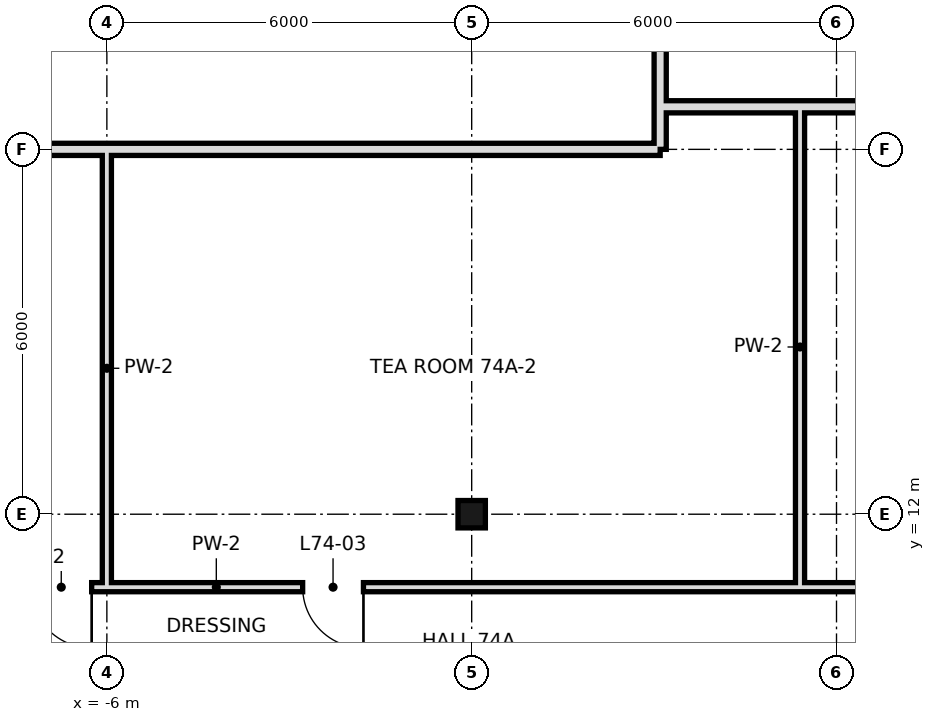
"""IFC4 building model, lengths in metres.
Left out: names, types, materials, properties, quantities, classifications, styles, units other than length and angle.
Written with IfcOpenShell. Run it as: python <this file> out.ifc"""

import sys

from ifc_helpers import new_model, si_unit, direction, frame, frame_2d, origin, origin_2d, place, context, subcontext, project, spatial, rectangle, hollow_rectangle, extrude, element, fill, save


model = new_model("IFC4")
c1 = context("Model", 3, precision=1e-05, world=origin(), true_north=direction((0.0, 1.0)))
c2 = subcontext(c1, "Body", "Model", "MODEL_VIEW")
j1 = project(units=[si_unit("LENGTHUNIT", "METRE"), si_unit("PLANEANGLEUNIT", "RADIAN")], contexts=[c1])
p1 = place(None, origin())
s1 = spatial("IfcSite", under=j1, at=p1, CompositionType="ELEMENT")
p2 = place(p1, origin())
s2 = spatial("IfcBuilding", under=s1, at=p2, CompositionType="ELEMENT")
p3 = place(p2, frame((0.0, 0.0, 312.4)))
s3 = spatial("IfcBuildingStorey", under=s2, at=p3, CompositionType="ELEMENT", Elevation=312.4)
p4 = place(p3, frame((0.0, 12.0, 0.0), z_axis=(0.0, 0.0, 1.0), x_axis=(1.0, 0.0, 0.0)))
e1 = element("IfcColumn", 1, at=p4, inside=s3, PredefinedType="COLUMN", context=c2, shape_type="SweptSolid", body=[
    extrude(hollow_rectangle(XDim=0.45, YDim=0.45, WallThickness=0.022, at=origin_2d()), origin(), (0.0, 0.0, 1.0), 3.6),
])
p5 = place(p3, frame((-6.0, 10.8, 0.0), z_axis=(0.0, 0.0, 1.0), x_axis=(0.0, 1.0, 0.0)))
e2 = element("IfcWall", 2, at=p5, inside=s3, PredefinedType="PARTITIONING", context=c2, shape_type="SweptSolid", body=[
    extrude(rectangle(XDim=7.2, YDim=0.15, at=frame_2d((3.6, 0.0))), origin(), (0.0, 0.0, 1.0), 3.42),
])
p6 = place(p3, frame((3.1, 18.7, 0.0), z_axis=(0.0, 0.0, 1.0), x_axis=(0.0, 1.0, 0.0)))
e3 = element("IfcWall", 3, at=p6, inside=s3, PredefinedType="SOLIDWALL", context=c2, shape_type="SweptSolid", body=[
    extrude(rectangle(XDim=22.7, YDim=0.2, at=frame_2d((11.35, 0.0))), origin(), (0.0, 0.0, 1.0), 2.97),
])
p7 = place(p6, frame((8.9, 0.0, 0.0)))
e4 = element("IfcOpeningElement", 4, at=p7, cuts=e3, PredefinedType="OPENING", context=c2, shape_type="SweptSolid", body=[
    extrude(rectangle(XDim=1.2, YDim=2.4, at=frame_2d((0.6, 1.2))), frame((0.0, 0.11, 0.0), z_axis=(0.0, -1.0, 0.0), x_axis=(1.0, 0.0, 0.0)), (0.0, 0.0, 1.0), 0.22),
])
p8 = place(p3, frame((3.1, 18.0, 0.0), z_axis=(0.0, 0.0, 1.0), x_axis=(0.0, 1.0, 0.0)))
e5 = element("IfcWall", 5, at=p8, inside=s3, PredefinedType="SOLIDWALL", context=c2, shape_type="SweptSolid", body=[
    extrude(rectangle(XDim=0.7, YDim=0.2, at=frame_2d((0.35, 0.0))), origin(), (0.0, 0.0, 1.0), 2.97),
])
p9 = place(p3, frame((5.4, 10.8, 0.0), z_axis=(0.0, 0.0, 1.0), x_axis=(0.0, 1.0, 0.0)))
e6 = element("IfcWall", 6, at=p9, inside=s3, PredefinedType="PARTITIONING", context=c2, shape_type="SweptSolid", body=[
    extrude(rectangle(XDim=7.9, YDim=0.15, at=frame_2d((3.95, 0.0))), origin(), (0.0, 0.0, 1.0), 3.42),
])
p10 = place(p3, frame((-18.6, 10.8, 0.0), z_axis=(0.0, 0.0, 1.0), x_axis=(1.0, 0.0, 0.0)))
e7 = element("IfcWall", 7, at=p10, inside=s3, PredefinedType="PARTITIONING", context=c2, shape_type="SweptSolid", body=[
    extrude(rectangle(XDim=28.8, YDim=0.15, at=frame_2d((14.4, 0.0))), origin(), (0.0, 0.0, 1.0), 3.42),
])
p11 = place(p10, frame((25.9, 0.0, 0.0)))
e8 = element("IfcOpeningElement", 8, at=p11, cuts=e7, PredefinedType="OPENING", context=c2, shape_type="SweptSolid", body=[
    extrude(rectangle(XDim=1.0, YDim=2.4, at=frame_2d((0.5, 1.2))), frame((0.0, 0.085, 0.0), z_axis=(0.0, -1.0, 0.0), x_axis=(1.0, 0.0, 0.0)), (0.0, 0.0, 1.0), 0.17),
])
p12 = place(p10, frame((11.35, 0.0, 0.0)))
e9 = element("IfcOpeningElement", 9, at=p12, cuts=e7, PredefinedType="OPENING", context=c2, shape_type="SweptSolid", body=[
    extrude(rectangle(XDim=1.0, YDim=2.4, at=frame_2d((0.5, 1.2))), frame((0.0, 0.085, 0.0), z_axis=(0.0, -1.0, 0.0), x_axis=(1.0, 0.0, 0.0)), (0.0, 0.0, 1.0), 0.17),
])
p13 = place(p10, frame((15.82, 0.0, 0.0)))
e10 = element("IfcOpeningElement", 10, at=p13, cuts=e7, PredefinedType="OPENING", context=c2, shape_type="SweptSolid", body=[
    extrude(rectangle(XDim=1.0, YDim=2.4, at=frame_2d((0.5, 1.2))), frame((0.0, 0.085, 0.0), z_axis=(0.0, -1.0, 0.0), x_axis=(1.0, 0.0, 0.0)), (0.0, 0.0, 1.0), 0.17),
])
p14 = place(p3, frame((-18.6, 18.0, 0.0), z_axis=(0.0, 0.0, 1.0), x_axis=(1.0, 0.0, 0.0)))
e11 = element("IfcWall", 11, at=p14, inside=s3, PredefinedType="SOLIDWALL", context=c2, shape_type="SweptSolid", body=[
    extrude(rectangle(XDim=21.7, YDim=0.2, at=frame_2d((10.85, 0.0))), origin(), (0.0, 0.0, 1.0), 2.72),
])
p15 = place(p3, frame((3.1, 18.7, 0.0), z_axis=(0.0, 0.0, 1.0), x_axis=(1.0, 0.0, 0.0)))
e12 = element("IfcWall", 12, at=p15, inside=s3, PredefinedType="SOLIDWALL", context=c2, shape_type="SweptSolid", body=[
    extrude(rectangle(XDim=7.1, YDim=0.2, at=frame_2d((3.55, 0.0))), origin(), (0.0, 0.0, 1.0), 2.72),
])
p16 = place(p15, frame((3.48, 0.0, 0.0)))
e13 = element("IfcOpeningElement", 13, at=p16, cuts=e12, PredefinedType="OPENING", context=c2, shape_type="SweptSolid", body=[
    extrude(rectangle(XDim=1.2, YDim=2.4, at=frame_2d((0.6, 1.2))), frame((0.0, 0.11, 0.0), z_axis=(0.0, -1.0, 0.0), x_axis=(1.0, 0.0, 0.0)), (0.0, 0.0, 1.0), 0.22),
])
p17 = place(p12, origin())
e14 = element("IfcDoor", 14, at=p17, inside=s3, OperationType="SINGLE_SWING_RIGHT", PredefinedType="DOOR", context=c2, shape_type="SweptSolid", body=[
    extrude(rectangle(XDim=1.0, YDim=2.4, at=frame_2d((0.5, 1.2))), frame((0.0, 0.025, 0.0), z_axis=(0.0, -1.0, 0.0), x_axis=(1.0, 0.0, 0.0)), (0.0, 0.0, 1.0), 0.05),
])
fill(e9, e14)
p18 = place(p13, origin())
e15 = element("IfcDoor", 15, at=p18, inside=s3, OperationType="SINGLE_SWING_RIGHT", PredefinedType="DOOR", context=c2, shape_type="SweptSolid", body=[
    extrude(rectangle(XDim=1.0, YDim=2.4, at=frame_2d((0.5, 1.2))), frame((0.0, 0.025, 0.0), z_axis=(0.0, -1.0, 0.0), x_axis=(1.0, 0.0, 0.0)), (0.0, 0.0, 1.0), 0.05),
])
fill(e10, e15)
save(model, sys.argv[1])
